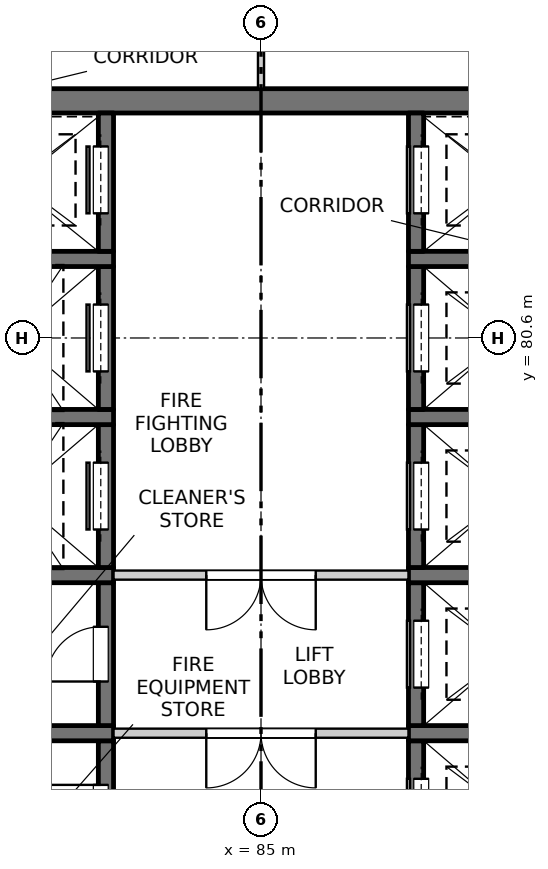
"""IFC4 building model, lengths in metres.
Left out: names, types, materials, properties, quantities, classifications, styles, units other than length and angle.
Written with IfcOpenShell. Run it as: python <this file> out.ifc"""

import sys

from ifc_helpers import new_model, si_unit, direction, frame, frame_2d, origin, place, context, subcontext, project, spatial, rectangle, extrude, element, fill, save


model = new_model("IFC4")
c1 = context("Model", 3, precision=1e-05, world=origin(), true_north=direction((0.0, 1.0)))
c2 = subcontext(c1, "Body", "Model", "MODEL_VIEW")
j1 = project(units=[si_unit("LENGTHUNIT", "METRE"), si_unit("PLANEANGLEUNIT", "RADIAN")], contexts=[c1])
p1 = place(None, origin())
s1 = spatial("IfcSite", under=j1, at=p1, CompositionType="ELEMENT")
p2 = place(p1, origin())
s2 = spatial("IfcBuilding", under=s1, at=p2, CompositionType="ELEMENT")
p3 = place(p2, frame((0.0, 0.0, 214.3)))
s3 = spatial("IfcBuildingStorey", under=s2, at=p3, CompositionType="ELEMENT", Elevation=214.3)
p4 = place(p3, frame((75.45, 84.5, -0.25), z_axis=(0.0, 0.0, 1.0), x_axis=(1.0, 0.0, 0.0)))
e1 = element("IfcWall", 1, at=p4, inside=s3, PredefinedType="SOLIDWALL", context=c2, shape_type="SweptSolid", body=[
    extrude(rectangle(XDim=19.1, YDim=0.4, at=frame_2d((9.55, 0.0))), origin(), (0.0, 0.0, 1.0), 3.4),
])
p5 = place(p3, frame((82.45, 71.625, -0.25), z_axis=(0.0, 0.0, 1.0), x_axis=(0.0, 1.0, 0.0)))
e2 = element("IfcWall", 2, at=p5, inside=s3, PredefinedType="SOLIDWALL", context=c2, shape_type="SweptSolid", body=[
    extrude(rectangle(XDim=2.35, YDim=0.25, at=frame_2d((1.175, 0.0))), origin(), (0.0, 0.0, 1.0), 3.4),
])
p6 = place(p5, frame((0.725, 0.0, 0.25)))
e3 = element("IfcOpeningElement", 3, at=p6, cuts=e2, PredefinedType="OPENING", context=c2, shape_type="SweptSolid", body=[
    extrude(rectangle(XDim=0.9, YDim=2.1, at=frame_2d((0.45, 1.05))), frame((0.0, 0.135, 0.0), z_axis=(0.0, -1.0, 0.0), x_axis=(1.0, 0.0, 0.0)), (0.0, 0.0, 1.0), 0.27),
])
p7 = place(p3, frame((79.575, 74.1, -0.25), z_axis=(0.0, 0.0, 1.0), x_axis=(1.0, 0.0, 0.0)))
e4 = element("IfcWall", 4, at=p7, inside=s3, PredefinedType="SOLIDWALL", context=c2, shape_type="SweptSolid", body=[
    extrude(rectangle(XDim=3.0, YDim=0.25, at=frame_2d((1.5, 0.0))), origin(), (0.0, 0.0, 1.0), 3.4),
])
p8 = place(p3, frame((82.45, 74.225, -0.25), z_axis=(0.0, 0.0, 1.0), x_axis=(0.0, 1.0, 0.0)))
e5 = element("IfcWall", 5, at=p8, inside=s3, PredefinedType="SOLIDWALL", context=c2, shape_type="SweptSolid", body=[
    extrude(rectangle(XDim=2.35, YDim=0.25, at=frame_2d((1.175, 0.0))), origin(), (0.0, 0.0, 1.0), 3.4),
])
p9 = place(p8, frame((0.725, 0.0, 0.25)))
e6 = element("IfcOpeningElement", 6, at=p9, cuts=e5, PredefinedType="OPENING", context=c2, shape_type="SweptSolid", body=[
    extrude(rectangle(XDim=0.9, YDim=2.1, at=frame_2d((0.45, 1.05))), frame((0.0, 0.135, 0.0), z_axis=(0.0, -1.0, 0.0), x_axis=(1.0, 0.0, 0.0)), (0.0, 0.0, 1.0), 0.27),
])
p10 = place(p3, frame((79.575, 76.7, -0.25), z_axis=(0.0, 0.0, 1.0), x_axis=(1.0, 0.0, 0.0)))
e7 = element("IfcWall", 7, at=p10, inside=s3, PredefinedType="SOLIDWALL", context=c2, shape_type="SweptSolid", body=[
    extrude(rectangle(XDim=3.0, YDim=0.25, at=frame_2d((1.5, 0.0))), origin(), (0.0, 0.0, 1.0), 3.4),
])
p11 = place(p3, frame((82.45, 76.825, -0.25), z_axis=(0.0, 0.0, 1.0), x_axis=(0.0, 1.0, 0.0)))
e8 = element("IfcWall", 8, at=p11, inside=s3, PredefinedType="SOLIDWALL", context=c2, shape_type="SweptSolid", body=[
    extrude(rectangle(XDim=2.35, YDim=0.25, at=frame_2d((1.175, 0.0))), origin(), (0.0, 0.0, 1.0), 3.4),
])
p12 = place(p11, frame((0.625, 0.0, 0.25)))
e9 = element("IfcOpeningElement", 9, at=p12, cuts=e8, PredefinedType="OPENING", context=c2, shape_type="SweptSolid", body=[
    extrude(rectangle(XDim=1.1, YDim=2.1, at=frame_2d((0.55, 1.05))), frame((0.0, 0.135, 0.0), z_axis=(0.0, -1.0, 0.0), x_axis=(1.0, 0.0, 0.0)), (0.0, 0.0, 1.0), 0.27),
])
p13 = place(p3, frame((79.575, 79.3, -0.25), z_axis=(0.0, 0.0, 1.0), x_axis=(1.0, 0.0, 0.0)))
e10 = element("IfcWall", 10, at=p13, inside=s3, PredefinedType="SOLIDWALL", context=c2, shape_type="SweptSolid", body=[
    extrude(rectangle(XDim=3.0, YDim=0.25, at=frame_2d((1.5, 0.0))), origin(), (0.0, 0.0, 1.0), 3.4),
])
p14 = place(p3, frame((82.45, 79.425, -0.25), z_axis=(0.0, 0.0, 1.0), x_axis=(0.0, 1.0, 0.0)))
e11 = element("IfcWall", 11, at=p14, inside=s3, PredefinedType="SOLIDWALL", context=c2, shape_type="SweptSolid", body=[
    extrude(rectangle(XDim=2.35, YDim=0.25, at=frame_2d((1.175, 0.0))), origin(), (0.0, 0.0, 1.0), 3.4),
])
p15 = place(p14, frame((0.625, 0.0, 0.25)))
e12 = element("IfcOpeningElement", 12, at=p15, cuts=e11, PredefinedType="OPENING", context=c2, shape_type="SweptSolid", body=[
    extrude(rectangle(XDim=1.1, YDim=2.1, at=frame_2d((0.55, 1.05))), frame((0.0, 0.135, 0.0), z_axis=(0.0, -1.0, 0.0), x_axis=(1.0, 0.0, 0.0)), (0.0, 0.0, 1.0), 0.27),
])
p16 = place(p3, frame((79.575, 81.9, -0.25), z_axis=(0.0, 0.0, 1.0), x_axis=(1.0, 0.0, 0.0)))
e13 = element("IfcWall", 13, at=p16, inside=s3, PredefinedType="SOLIDWALL", context=c2, shape_type="SweptSolid", body=[
    extrude(rectangle(XDim=3.0, YDim=0.25, at=frame_2d((1.5, 0.0))), origin(), (0.0, 0.0, 1.0), 3.4),
])
p17 = place(p3, frame((82.45, 82.025, -0.25), z_axis=(0.0, 0.0, 1.0), x_axis=(0.0, 1.0, 0.0)))
e14 = element("IfcWall", 14, at=p17, inside=s3, PredefinedType="SOLIDWALL", context=c2, shape_type="SweptSolid", body=[
    extrude(rectangle(XDim=2.275, YDim=0.25, at=frame_2d((1.138, 0.0))), origin(), (0.0, 0.0, 1.0), 3.4),
])
p18 = place(p17, frame((0.625, 0.0, 0.25)))
e15 = element("IfcOpeningElement", 15, at=p18, cuts=e14, PredefinedType="OPENING", context=c2, shape_type="SweptSolid", body=[
    extrude(rectangle(XDim=1.1, YDim=2.1, at=frame_2d((0.55, 1.05))), frame((0.0, 0.135, 0.0), z_axis=(0.0, -1.0, 0.0), x_axis=(1.0, 0.0, 0.0)), (0.0, 0.0, 1.0), 0.27),
])
p19 = place(p3, frame((87.55, 71.625, -0.25), z_axis=(0.0, 0.0, 1.0), x_axis=(0.0, 1.0, 0.0)))
e16 = element("IfcWall", 16, at=p19, inside=s3, PredefinedType="SOLIDWALL", context=c2, shape_type="SweptSolid", body=[
    extrude(rectangle(XDim=2.35, YDim=0.25, at=frame_2d((1.175, 0.0))), origin(), (0.0, 0.0, 1.0), 3.4),
])
p20 = place(p19, frame((0.625, 0.0, 0.25)))
e17 = element("IfcOpeningElement", 17, at=p20, cuts=e16, PredefinedType="OPENING", context=c2, shape_type="SweptSolid", body=[
    extrude(rectangle(XDim=1.1, YDim=2.1, at=frame_2d((0.55, 1.05))), frame((0.0, 0.135, 0.0), z_axis=(0.0, -1.0, 0.0), x_axis=(1.0, 0.0, 0.0)), (0.0, 0.0, 1.0), 0.27),
])
p21 = place(p3, frame((87.425, 74.1, -0.25), z_axis=(0.0, 0.0, 1.0), x_axis=(1.0, 0.0, 0.0)))
e18 = element("IfcWall", 18, at=p21, inside=s3, PredefinedType="SOLIDWALL", context=c2, shape_type="SweptSolid", body=[
    extrude(rectangle(XDim=3.0, YDim=0.25, at=frame_2d((1.5, 0.0))), origin(), (0.0, 0.0, 1.0), 3.4),
])
p22 = place(p3, frame((87.55, 74.225, -0.25), z_axis=(0.0, 0.0, 1.0), x_axis=(0.0, 1.0, 0.0)))
e19 = element("IfcWall", 19, at=p22, inside=s3, PredefinedType="SOLIDWALL", context=c2, shape_type="SweptSolid", body=[
    extrude(rectangle(XDim=2.35, YDim=0.25, at=frame_2d((1.175, 0.0))), origin(), (0.0, 0.0, 1.0), 3.4),
])
p23 = place(p22, frame((0.625, 0.0, 0.25)))
e20 = element("IfcOpeningElement", 20, at=p23, cuts=e19, PredefinedType="OPENING", context=c2, shape_type="SweptSolid", body=[
    extrude(rectangle(XDim=1.1, YDim=2.1, at=frame_2d((0.55, 1.05))), frame((0.0, 0.135, 0.0), z_axis=(0.0, -1.0, 0.0), x_axis=(1.0, 0.0, 0.0)), (0.0, 0.0, 1.0), 0.27),
])
p24 = place(p3, frame((87.425, 76.7, -0.25), z_axis=(0.0, 0.0, 1.0), x_axis=(1.0, 0.0, 0.0)))
e21 = element("IfcWall", 21, at=p24, inside=s3, PredefinedType="SOLIDWALL", context=c2, shape_type="SweptSolid", body=[
    extrude(rectangle(XDim=3.0, YDim=0.25, at=frame_2d((1.5, 0.0))), origin(), (0.0, 0.0, 1.0), 3.4),
])
p25 = place(p3, frame((87.55, 76.825, -0.25), z_axis=(0.0, 0.0, 1.0), x_axis=(0.0, 1.0, 0.0)))
e22 = element("IfcWall", 22, at=p25, inside=s3, PredefinedType="SOLIDWALL", context=c2, shape_type="SweptSolid", body=[
    extrude(rectangle(XDim=2.35, YDim=0.25, at=frame_2d((1.175, 0.0))), origin(), (0.0, 0.0, 1.0), 3.4),
])
p26 = place(p25, frame((0.625, 0.0, 0.25)))
e23 = element("IfcOpeningElement", 23, at=p26, cuts=e22, PredefinedType="OPENING", context=c2, shape_type="SweptSolid", body=[
    extrude(rectangle(XDim=1.1, YDim=2.1, at=frame_2d((0.55, 1.05))), frame((0.0, 0.135, 0.0), z_axis=(0.0, -1.0, 0.0), x_axis=(1.0, 0.0, 0.0)), (0.0, 0.0, 1.0), 0.27),
])
p27 = place(p3, frame((87.425, 79.3, -0.25), z_axis=(0.0, 0.0, 1.0), x_axis=(1.0, 0.0, 0.0)))
e24 = element("IfcWall", 24, at=p27, inside=s3, PredefinedType="SOLIDWALL", context=c2, shape_type="SweptSolid", body=[
    extrude(rectangle(XDim=3.0, YDim=0.25, at=frame_2d((1.5, 0.0))), origin(), (0.0, 0.0, 1.0), 3.4),
])
p28 = place(p3, frame((87.55, 79.425, -0.25), z_axis=(0.0, 0.0, 1.0), x_axis=(0.0, 1.0, 0.0)))
e25 = element("IfcWall", 25, at=p28, inside=s3, PredefinedType="SOLIDWALL", context=c2, shape_type="SweptSolid", body=[
    extrude(rectangle(XDim=2.35, YDim=0.25, at=frame_2d((1.175, 0.0))), origin(), (0.0, 0.0, 1.0), 3.4),
])
p29 = place(p28, frame((0.625, 0.0, 0.25)))
e26 = element("IfcOpeningElement", 26, at=p29, cuts=e25, PredefinedType="OPENING", context=c2, shape_type="SweptSolid", body=[
    extrude(rectangle(XDim=1.1, YDim=2.1, at=frame_2d((0.55, 1.05))), frame((0.0, 0.135, 0.0), z_axis=(0.0, -1.0, 0.0), x_axis=(1.0, 0.0, 0.0)), (0.0, 0.0, 1.0), 0.27),
])
p30 = place(p3, frame((87.425, 81.9, -0.25), z_axis=(0.0, 0.0, 1.0), x_axis=(1.0, 0.0, 0.0)))
e27 = element("IfcWall", 27, at=p30, inside=s3, PredefinedType="SOLIDWALL", context=c2, shape_type="SweptSolid", body=[
    extrude(rectangle(XDim=3.0, YDim=0.25, at=frame_2d((1.5, 0.0))), origin(), (0.0, 0.0, 1.0), 3.4),
])
p31 = place(p3, frame((87.55, 82.025, -0.25), z_axis=(0.0, 0.0, 1.0), x_axis=(0.0, 1.0, 0.0)))
e28 = element("IfcWall", 28, at=p31, inside=s3, PredefinedType="SOLIDWALL", context=c2, shape_type="SweptSolid", body=[
    extrude(rectangle(XDim=2.275, YDim=0.25, at=frame_2d((1.138, 0.0))), origin(), (0.0, 0.0, 1.0), 3.4),
])
p32 = place(p31, frame((0.625, 0.0, 0.25)))
e29 = element("IfcOpeningElement", 29, at=p32, cuts=e28, PredefinedType="OPENING", context=c2, shape_type="SweptSolid", body=[
    extrude(rectangle(XDim=1.1, YDim=2.1, at=frame_2d((0.55, 1.05))), frame((0.0, 0.135, 0.0), z_axis=(0.0, -1.0, 0.0), x_axis=(1.0, 0.0, 0.0)), (0.0, 0.0, 1.0), 0.27),
])
p33 = place(p3, frame((82.575, 74.1, 0.0), z_axis=(0.0, 0.0, 1.0), x_axis=(1.0, 0.0, 0.0)))
e30 = element("IfcWall", 30, at=p33, inside=s3, PredefinedType="PARTITIONING", context=c2, shape_type="SweptSolid", body=[
    extrude(rectangle(XDim=4.85, YDim=0.15, at=frame_2d((2.425, 0.0))), origin(), (0.0, 0.0, 1.0), 3.15),
])
p34 = place(p33, frame((1.525, 0.0, 0.0)))
e31 = element("IfcOpeningElement", 31, at=p34, cuts=e30, PredefinedType="OPENING", context=c2, shape_type="SweptSolid", body=[
    extrude(rectangle(XDim=1.8, YDim=2.1, at=frame_2d((0.9, 1.05))), frame((0.0, 0.085, 0.0), z_axis=(0.0, -1.0, 0.0), x_axis=(1.0, 0.0, 0.0)), (0.0, 0.0, 1.0), 0.17),
])
p35 = place(p3, frame((82.575, 76.7, 0.0), z_axis=(0.0, 0.0, 1.0), x_axis=(1.0, 0.0, 0.0)))
e32 = element("IfcWall", 32, at=p35, inside=s3, PredefinedType="PARTITIONING", context=c2, shape_type="SweptSolid", body=[
    extrude(rectangle(XDim=4.85, YDim=0.15, at=frame_2d((2.425, 0.0))), origin(), (0.0, 0.0, 1.0), 3.15),
])
p36 = place(p35, frame((1.525, 0.0, 0.0)))
e33 = element("IfcOpeningElement", 33, at=p36, cuts=e32, PredefinedType="OPENING", context=c2, shape_type="SweptSolid", body=[
    extrude(rectangle(XDim=1.8, YDim=2.1, at=frame_2d((0.9, 1.05))), frame((0.0, 0.085, 0.0), z_axis=(0.0, -1.0, 0.0), x_axis=(1.0, 0.0, 0.0)), (0.0, 0.0, 1.0), 0.17),
])
p37 = place(p3, frame((85.0, 84.7, 0.0), z_axis=(0.0, 0.0, 1.0), x_axis=(0.0, 1.0, 0.0)))
e34 = element("IfcWall", 34, at=p37, inside=s3, PredefinedType="PARTITIONING", context=c2, shape_type="SweptSolid", body=[
    extrude(rectangle(XDim=3.4, YDim=0.1, at=frame_2d((1.7, 0.0))), origin(), (0.0, 0.0, 1.0), 3.15),
])
p38 = place(p37, frame((1.3, 0.0, 0.0)))
e35 = element("IfcOpeningElement", 35, at=p38, cuts=e34, PredefinedType="OPENING", context=c2, shape_type="SweptSolid", body=[
    extrude(rectangle(XDim=0.9, YDim=2.1, at=frame_2d((0.45, 1.05))), frame((0.0, 0.06, 0.0), z_axis=(0.0, -1.0, 0.0), x_axis=(1.0, 0.0, 0.0)), (0.0, 0.0, 1.0), 0.12),
])
p39 = place(p6, origin())
e36 = element("IfcDoor", 36, at=p39, inside=s3, OperationType="SINGLE_SWING_RIGHT", PredefinedType="DOOR", context=c2, shape_type="SweptSolid", body=[
    extrude(rectangle(XDim=0.9, YDim=2.1, at=frame_2d((0.45, 1.05))), frame((0.0, 0.11, 0.0), z_axis=(0.0, -1.0, 0.0), x_axis=(1.0, 0.0, 0.0)), (0.0, 0.0, 1.0), 0.05),
])
fill(e3, e36)
p40 = place(p20, origin())
e37 = element("IfcDoor", 37, at=p40, inside=s3, OperationType="SLIDING_TO_LEFT", PredefinedType="DOOR", context=c2, shape_type="SweptSolid", body=[
    extrude(rectangle(XDim=1.1, YDim=2.1, at=frame_2d((0.55, 1.05))), frame((0.0, -0.06, 0.0), z_axis=(0.0, -1.0, 0.0), x_axis=(1.0, 0.0, 0.0)), (0.0, 0.0, 1.0), 0.05),
])
fill(e17, e37)
p41 = place(p34, origin())
e38 = element("IfcDoor", 38, at=p41, inside=s3, OperationType="DOUBLE_DOOR_SINGLE_SWING", PredefinedType="DOOR", context=c2, shape_type="SweptSolid", body=[
    extrude(rectangle(XDim=1.8, YDim=2.1, at=frame_2d((0.9, 1.05))), frame((0.0, 0.025, 0.0), z_axis=(0.0, -1.0, 0.0), x_axis=(1.0, 0.0, 0.0)), (0.0, 0.0, 1.0), 0.05),
])
fill(e31, e38)
p42 = place(p9, origin())
e39 = element("IfcDoor", 39, at=p42, inside=s3, OperationType="SINGLE_SWING_LEFT", PredefinedType="DOOR", context=c2, shape_type="SweptSolid", body=[
    extrude(rectangle(XDim=0.9, YDim=2.1, at=frame_2d((0.45, 1.05))), frame((0.0, 0.11, 0.0), z_axis=(0.0, -1.0, 0.0), x_axis=(1.0, 0.0, 0.0)), (0.0, 0.0, 1.0), 0.05),
])
fill(e6, e39)
p43 = place(p23, origin())
e40 = element("IfcDoor", 40, at=p43, inside=s3, OperationType="SLIDING_TO_LEFT", PredefinedType="DOOR", context=c2, shape_type="SweptSolid", body=[
    extrude(rectangle(XDim=1.1, YDim=2.1, at=frame_2d((0.55, 1.05))), frame((0.0, -0.06, 0.0), z_axis=(0.0, -1.0, 0.0), x_axis=(1.0, 0.0, 0.0)), (0.0, 0.0, 1.0), 0.05),
])
fill(e20, e40)
p44 = place(p36, origin())
e41 = element("IfcDoor", 41, at=p44, inside=s3, OperationType="DOUBLE_DOOR_SINGLE_SWING", PredefinedType="DOOR", context=c2, shape_type="SweptSolid", body=[
    extrude(rectangle(XDim=1.8, YDim=2.1, at=frame_2d((0.9, 1.05))), frame((0.0, 0.025, 0.0), z_axis=(0.0, -1.0, 0.0), x_axis=(1.0, 0.0, 0.0)), (0.0, 0.0, 1.0), 0.05),
])
fill(e33, e41)
p45 = place(p12, origin())
e42 = element("IfcDoor", 42, at=p45, inside=s3, OperationType="SLIDING_TO_LEFT", PredefinedType="DOOR", context=c2, shape_type="SweptSolid", body=[
    extrude(rectangle(XDim=1.1, YDim=2.1, at=frame_2d((0.55, 1.05))), frame((0.0, 0.11, 0.0), z_axis=(0.0, -1.0, 0.0), x_axis=(1.0, 0.0, 0.0)), (0.0, 0.0, 1.0), 0.05),
])
fill(e9, e42)
p46 = place(p26, origin())
e43 = element("IfcDoor", 43, at=p46, inside=s3, OperationType="SLIDING_TO_LEFT", PredefinedType="DOOR", context=c2, shape_type="SweptSolid", body=[
    extrude(rectangle(XDim=1.1, YDim=2.1, at=frame_2d((0.55, 1.05))), frame((0.0, -0.06, 0.0), z_axis=(0.0, -1.0, 0.0), x_axis=(1.0, 0.0, 0.0)), (0.0, 0.0, 1.0), 0.05),
])
fill(e23, e43)
p47 = place(p15, origin())
e44 = element("IfcDoor", 44, at=p47, inside=s3, OperationType="SLIDING_TO_LEFT", PredefinedType="DOOR", context=c2, shape_type="SweptSolid", body=[
    extrude(rectangle(XDim=1.1, YDim=2.1, at=frame_2d((0.55, 1.05))), frame((0.0, 0.11, 0.0), z_axis=(0.0, -1.0, 0.0), x_axis=(1.0, 0.0, 0.0)), (0.0, 0.0, 1.0), 0.05),
])
fill(e12, e44)
p48 = place(p29, origin())
e45 = element("IfcDoor", 45, at=p48, inside=s3, OperationType="SLIDING_TO_RIGHT", PredefinedType="DOOR", context=c2, shape_type="SweptSolid", body=[
    extrude(rectangle(XDim=1.1, YDim=2.1, at=frame_2d((0.55, 1.05))), frame((0.0, -0.06, 0.0), z_axis=(0.0, -1.0, 0.0), x_axis=(1.0, 0.0, 0.0)), (0.0, 0.0, 1.0), 0.05),
])
fill(e26, e45)
p49 = place(p18, origin())
e46 = element("IfcDoor", 46, at=p49, inside=s3, OperationType="SLIDING_TO_RIGHT", PredefinedType="DOOR", context=c2, shape_type="SweptSolid", body=[
    extrude(rectangle(XDim=1.1, YDim=2.1, at=frame_2d((0.55, 1.05))), frame((0.0, 0.11, 0.0), z_axis=(0.0, -1.0, 0.0), x_axis=(1.0, 0.0, 0.0)), (0.0, 0.0, 1.0), 0.05),
])
fill(e15, e46)
p50 = place(p32, origin())
e47 = element("IfcDoor", 47, at=p50, inside=s3, OperationType="SLIDING_TO_RIGHT", PredefinedType="DOOR", context=c2, shape_type="SweptSolid", body=[
    extrude(rectangle(XDim=1.1, YDim=2.1, at=frame_2d((0.55, 1.05))), frame((0.0, -0.06, 0.0), z_axis=(0.0, -1.0, 0.0), x_axis=(1.0, 0.0, 0.0)), (0.0, 0.0, 1.0), 0.05),
])
fill(e29, e47)
save(model, sys.argv[1])
